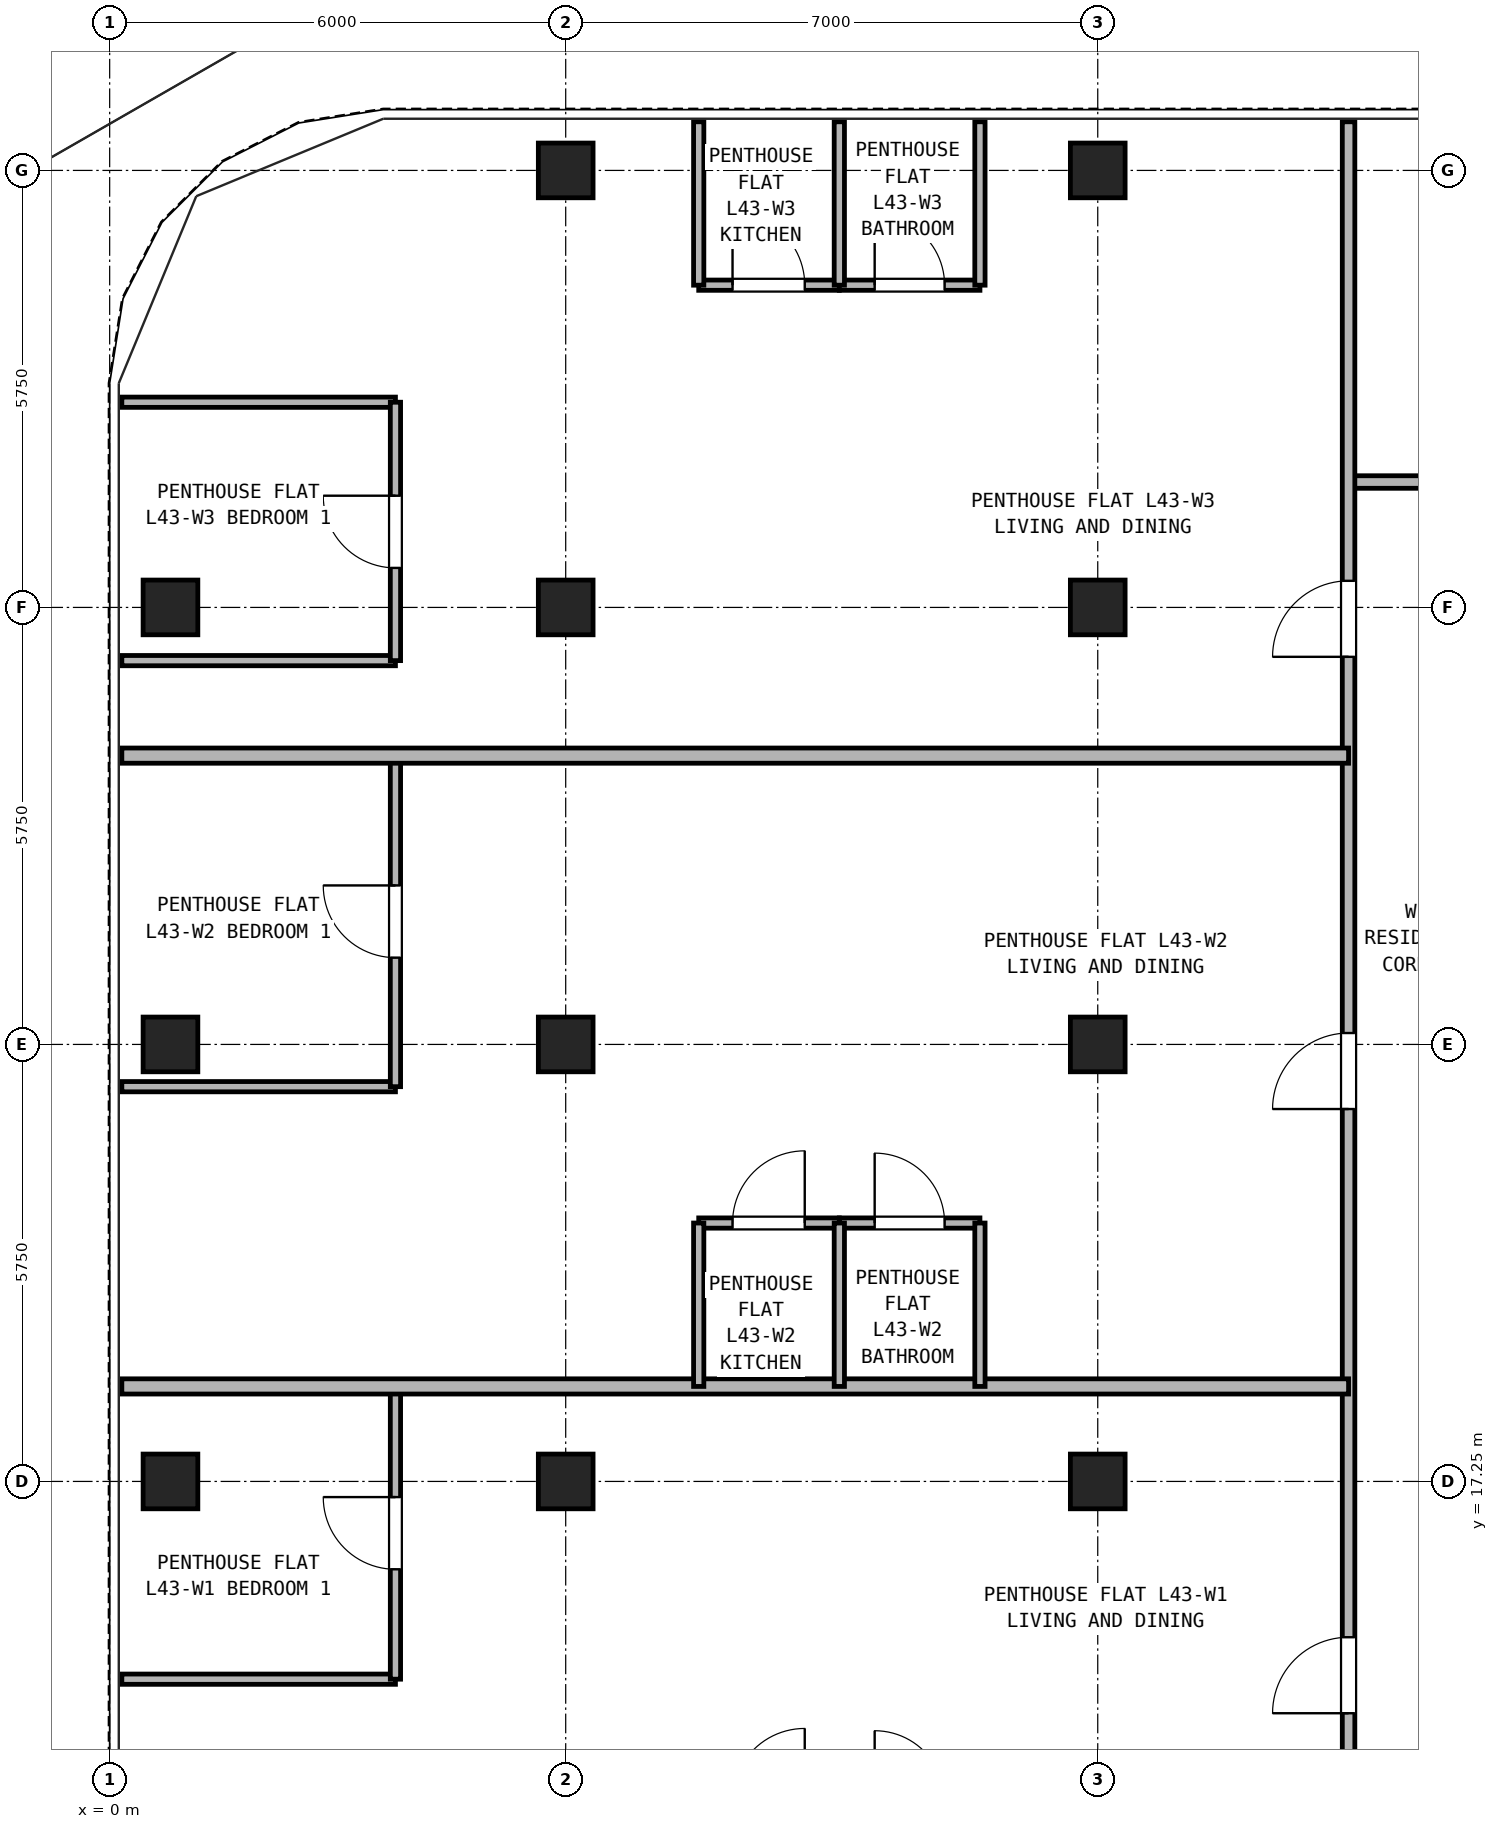
"""IFC4 building model, lengths in metres.
Left out: names, types, materials, properties, quantities, classifications, styles, units other than length and angle.
Written with IfcOpenShell. Run it as: python <this file> out.ifc"""

import sys

from ifc_helpers import new_model, si_unit, direction, frame, frame_2d, origin, origin_2d, place, context, subcontext, project, spatial, rectangle, hollow_rectangle, extrude, source, transform, mapped, element, fill, save


model = new_model("IFC4")
c1 = context("Model", 3, precision=1e-05, world=origin(), true_north=direction((0.0, 1.0)))
c2 = subcontext(c1, "Body", "Model", "MODEL_VIEW")
j1 = project(units=[si_unit("LENGTHUNIT", "METRE"), si_unit("PLANEANGLEUNIT", "RADIAN")], contexts=[c1])
p1 = place(None, origin())
s1 = spatial("IfcSite", under=j1, at=p1, CompositionType="ELEMENT")
p2 = place(p1, origin())
s2 = spatial("IfcBuilding", under=s1, at=p2, CompositionType="ELEMENT")
p3 = place(p2, frame((0.0, 0.0, 156.1)))
s3 = spatial("IfcBuildingStorey", under=s2, at=p3, CompositionType="ELEMENT", Elevation=156.1)
m1 = source(origin(), c2, "Body", "SweptSolid", [
    extrude(hollow_rectangle(XDim=0.72, YDim=0.72, WallThickness=0.04, at=origin_2d()), origin(), (0.0, 0.0, 1.0), 2.95),
])
for number, where, z_axis, x_axis in (
    (1, (6.0, 34.5, 0.0), (0.0, 0.0, 1.0), (1.0, 0.0, 0.0)),
    (2, (13.0, 34.5, 0.0), (0.0, 0.0, 1.0), (1.0, 0.0, 0.0)),
    (3, (0.8, 17.25, 0.0), (0.0, 0.0, 1.0), (1.0, 0.0, 0.0)),
    (4, (0.8, 23.0, 0.0), (0.0, 0.0, 1.0), (1.0, 0.0, 0.0)),
    (5, (0.8, 28.75, 0.0), (0.0, 0.0, 1.0), (1.0, 0.0, 0.0)),
    (6, (6.0, 17.25, 0.0), (0.0, 0.0, 1.0), (1.0, 0.0, 0.0)),
    (7, (6.0, 23.0, 0.0), (0.0, 0.0, 1.0), (1.0, 0.0, 0.0)),
    (8, (6.0, 28.75, 0.0), (0.0, 0.0, 1.0), (1.0, 0.0, 0.0)),
    (9, (13.0, 17.25, 0.0), (0.0, 0.0, 1.0), (1.0, 0.0, 0.0)),
    (10, (13.0, 23.0, 0.0), (0.0, 0.0, 1.0), (1.0, 0.0, 0.0)),
    (11, (13.0, 28.75, 0.0), (0.0, 0.0, 1.0), (1.0, 0.0, 0.0)),
):
    element("IfcColumn", number, at=place(p3, frame(where, z_axis=z_axis, x_axis=x_axis)), inside=s3, PredefinedType="COLUMN", context=c2, shape_type="MappedRepresentation", body=[
        mapped(m1, transform((0.0, 0.0, 0.0), x_axis=(1.0, 0.0, 0.0), y_axis=(0.0, 1.0, 0.0), z_axis=(0.0, 0.0, 1.0), scale=1.0)),
    ])
p4 = place(p3, frame((16.3, 30.4, 0.0), z_axis=(0.0, 0.0, 1.0), x_axis=(1.0, 0.0, 0.0)))
e12 = element("IfcWall", 12, at=p4, inside=s3, PredefinedType="PARTITIONING", context=c2, shape_type="SweptSolid", body=[
    extrude(rectangle(XDim=14.4, YDim=0.165, at=frame_2d((7.2, 0.0))), origin(), (0.0, 0.0, 1.0), 2.95),
])
p5 = place(p4, frame((2.35, 0.0, 0.0)))
e13 = element("IfcOpeningElement", 13, at=p5, cuts=e12, PredefinedType="OPENING", context=c2, shape_type="SweptSolid", body=[
    extrude(rectangle(XDim=0.95, YDim=2.15, at=frame_2d((0.475, 1.075))), frame((0.0, 0.093, 0.0), z_axis=(0.0, -1.0, 0.0), x_axis=(1.0, 0.0, 0.0)), (0.0, 0.0, 1.0), 0.185),
])
p6 = place(p4, frame((7.25, 0.0, 0.0)))
e14 = element("IfcOpeningElement", 14, at=p6, cuts=e12, PredefinedType="OPENING", context=c2, shape_type="SweptSolid", body=[
    extrude(rectangle(XDim=0.95, YDim=2.15, at=frame_2d((0.475, 1.075))), frame((0.0, 0.093, 0.0), z_axis=(0.0, -1.0, 0.0), x_axis=(1.0, 0.0, 0.0)), (0.0, 0.0, 1.0), 0.185),
])
p7 = place(p4, frame((11.6, 0.0, 0.0)))
e15 = element("IfcOpeningElement", 15, at=p7, cuts=e12, PredefinedType="OPENING", context=c2, shape_type="SweptSolid", body=[
    extrude(rectangle(XDim=0.92, YDim=2.1, at=frame_2d((0.46, 1.05))), frame((0.0, 0.093, 0.0), z_axis=(0.0, -1.0, 0.0), x_axis=(1.0, 0.0, 0.0)), (0.0, 0.0, 1.0), 0.185),
])
p8 = place(p3, frame((16.3, 10.9, 0.0), z_axis=(0.0, 0.0, 1.0), x_axis=(0.0, 1.0, 0.0)))
e16 = element("IfcWall", 16, at=p8, inside=s3, PredefinedType="PARTITIONING", context=c2, shape_type="SweptSolid", body=[
    extrude(rectangle(XDim=24.24, YDim=0.165, at=frame_2d((12.12, 0.0))), origin(), (0.0, 0.0, 1.0), 2.95),
])
p9 = place(p8, frame((3.3, 0.0, 0.0)))
e17 = element("IfcOpeningElement", 17, at=p9, cuts=e16, PredefinedType="OPENING", context=c2, shape_type="SweptSolid", body=[
    extrude(rectangle(XDim=1.0, YDim=2.15, at=frame_2d((0.5, 1.075))), frame((0.0, 0.093, 0.0), z_axis=(0.0, -1.0, 0.0), x_axis=(1.0, 0.0, 0.0)), (0.0, 0.0, 1.0), 0.185),
])
p10 = place(p8, frame((11.25, 0.0, 0.0)))
e18 = element("IfcOpeningElement", 18, at=p10, cuts=e16, PredefinedType="OPENING", context=c2, shape_type="SweptSolid", body=[
    extrude(rectangle(XDim=1.0, YDim=2.15, at=frame_2d((0.5, 1.075))), frame((0.0, 0.093, 0.0), z_axis=(0.0, -1.0, 0.0), x_axis=(1.0, 0.0, 0.0)), (0.0, 0.0, 1.0), 0.185),
])
p11 = place(p8, frame((17.2, 0.0, 0.0)))
e19 = element("IfcOpeningElement", 19, at=p11, cuts=e16, PredefinedType="OPENING", context=c2, shape_type="SweptSolid", body=[
    extrude(rectangle(XDim=1.0, YDim=2.15, at=frame_2d((0.5, 1.075))), frame((0.0, 0.093, 0.0), z_axis=(0.0, -1.0, 0.0), x_axis=(1.0, 0.0, 0.0)), (0.0, 0.0, 1.0), 0.185),
])
p12 = place(p3, frame((0.16, 14.648, 0.0), z_axis=(0.0, 0.0, 1.0), x_axis=(1.0, 0.0, 0.0)))
e20 = element("IfcWall", 20, at=p12, inside=s3, PredefinedType="PARTITIONING", context=c2, shape_type="SweptSolid", body=[
    extrude(rectangle(XDim=3.6, YDim=0.135, at=frame_2d((1.8, 0.0))), origin(), (0.0, 0.0, 1.0), 2.95),
])
p13 = place(p3, frame((3.76, 14.648, 0.0), z_axis=(0.0, 0.0, 1.0), x_axis=(0.0, 1.0, 0.0)))
e21 = element("IfcWall", 21, at=p13, inside=s3, PredefinedType="PARTITIONING", context=c2, shape_type="SweptSolid", body=[
    extrude(rectangle(XDim=3.852, YDim=0.135, at=frame_2d((1.926, 0.0))), origin(), (0.0, 0.0, 1.0), 2.95),
])
p14 = place(p13, frame((1.446, 0.0, 0.0)))
e22 = element("IfcOpeningElement", 22, at=p14, cuts=e21, PredefinedType="OPENING", context=c2, shape_type="SweptSolid", body=[
    extrude(rectangle(XDim=0.95, YDim=2.15, at=frame_2d((0.475, 1.075))), frame((0.0, 0.077, 0.0), z_axis=(0.0, -1.0, 0.0), x_axis=(1.0, 0.0, 0.0)), (0.0, 0.0, 1.0), 0.155),
])
p15 = place(p3, frame((0.16, 18.5, 0.0), z_axis=(0.0, 0.0, 1.0), x_axis=(1.0, 0.0, 0.0)))
e23 = element("IfcWall", 23, at=p15, inside=s3, PredefinedType="PARTITIONING", context=c2, shape_type="SweptSolid", body=[
    extrude(rectangle(XDim=16.14, YDim=0.2, at=frame_2d((8.07, 0.0))), origin(), (0.0, 0.0, 1.0), 2.95),
])
p16 = place(p3, frame((7.75, 20.65, 0.0), z_axis=(0.0, 0.0, 1.0), x_axis=(1.0, 0.0, 0.0)))
e24 = element("IfcWall", 24, at=p16, inside=s3, PredefinedType="PARTITIONING", context=c2, shape_type="SweptSolid", body=[
    extrude(rectangle(XDim=1.85, YDim=0.135, at=frame_2d((0.925, 0.0))), origin(), (0.0, 0.0, 1.0), 2.95),
])
p17 = place(p16, frame((0.445, 0.0, 0.0)))
e25 = element("IfcOpeningElement", 25, at=p17, cuts=e24, PredefinedType="OPENING", context=c2, shape_type="SweptSolid", body=[
    extrude(rectangle(XDim=0.95, YDim=2.15, at=frame_2d((0.475, 1.075))), frame((0.0, 0.077, 0.0), z_axis=(0.0, -1.0, 0.0), x_axis=(1.0, 0.0, 0.0)), (0.0, 0.0, 1.0), 0.155),
])
p18 = place(p3, frame((9.6, 20.65, 0.0), z_axis=(0.0, 0.0, 1.0), x_axis=(1.0, 0.0, 0.0)))
e26 = element("IfcWall", 26, at=p18, inside=s3, PredefinedType="PARTITIONING", context=c2, shape_type="SweptSolid", body=[
    extrude(rectangle(XDim=1.85, YDim=0.135, at=frame_2d((0.925, 0.0))), origin(), (0.0, 0.0, 1.0), 2.95),
])
p19 = place(p18, frame((0.465, 0.0, 0.0)))
e27 = element("IfcOpeningElement", 27, at=p19, cuts=e26, PredefinedType="OPENING", context=c2, shape_type="SweptSolid", body=[
    extrude(rectangle(XDim=0.92, YDim=2.1, at=frame_2d((0.46, 1.05))), frame((0.0, 0.077, 0.0), z_axis=(0.0, -1.0, 0.0), x_axis=(1.0, 0.0, 0.0)), (0.0, 0.0, 1.0), 0.155),
])
for number, where, z_axis, x_axis in (
    (28, (7.75, 18.5, 0.0), (0.0, 0.0, 1.0), (0.0, 1.0, 0.0)),
    (29, (9.6, 18.5, 0.0), (0.0, 0.0, 1.0), (0.0, 1.0, 0.0)),
    (30, (11.45, 18.5, 0.0), (0.0, 0.0, 1.0), (0.0, 1.0, 0.0)),
):
    element("IfcWall", number, at=place(p3, frame(where, z_axis=z_axis, x_axis=x_axis)), inside=s3, PredefinedType="PARTITIONING", context=c2, shape_type="SweptSolid", body=[
        extrude(rectangle(XDim=2.15, YDim=0.135, at=frame_2d((1.075, 0.0))), origin(), (0.0, 0.0, 1.0), 2.95),
    ])
p20 = place(p3, frame((0.16, 22.444, 0.0), z_axis=(0.0, 0.0, 1.0), x_axis=(1.0, 0.0, 0.0)))
e31 = element("IfcWall", 31, at=p20, inside=s3, PredefinedType="PARTITIONING", context=c2, shape_type="SweptSolid", body=[
    extrude(rectangle(XDim=3.6, YDim=0.135, at=frame_2d((1.8, 0.0))), origin(), (0.0, 0.0, 1.0), 2.95),
])
p21 = place(p3, frame((3.76, 22.444, 0.0), z_axis=(0.0, 0.0, 1.0), x_axis=(0.0, 1.0, 0.0)))
e32 = element("IfcWall", 32, at=p21, inside=s3, PredefinedType="PARTITIONING", context=c2, shape_type="SweptSolid", body=[
    extrude(rectangle(XDim=4.356, YDim=0.135, at=frame_2d((2.178, 0.0))), origin(), (0.0, 0.0, 1.0), 2.95),
])
p22 = place(p21, frame((1.698, 0.0, 0.0)))
e33 = element("IfcOpeningElement", 33, at=p22, cuts=e32, PredefinedType="OPENING", context=c2, shape_type="SweptSolid", body=[
    extrude(rectangle(XDim=0.95, YDim=2.15, at=frame_2d((0.475, 1.075))), frame((0.0, 0.077, 0.0), z_axis=(0.0, -1.0, 0.0), x_axis=(1.0, 0.0, 0.0)), (0.0, 0.0, 1.0), 0.155),
])
p23 = place(p3, frame((0.16, 26.8, 0.0), z_axis=(0.0, 0.0, 1.0), x_axis=(1.0, 0.0, 0.0)))
e34 = element("IfcWall", 34, at=p23, inside=s3, PredefinedType="PARTITIONING", context=c2, shape_type="SweptSolid", body=[
    extrude(rectangle(XDim=16.14, YDim=0.2, at=frame_2d((8.07, 0.0))), origin(), (0.0, 0.0, 1.0), 2.95),
])
p24 = place(p3, frame((7.75, 32.99, 0.0), z_axis=(0.0, 0.0, 1.0), x_axis=(1.0, 0.0, 0.0)))
e35 = element("IfcWall", 35, at=p24, inside=s3, PredefinedType="PARTITIONING", context=c2, shape_type="SweptSolid", body=[
    extrude(rectangle(XDim=1.85, YDim=0.135, at=frame_2d((0.925, 0.0))), origin(), (0.0, 0.0, 1.0), 2.95),
])
p25 = place(p24, frame((0.445, 0.0, 0.0)))
e36 = element("IfcOpeningElement", 36, at=p25, cuts=e35, PredefinedType="OPENING", context=c2, shape_type="SweptSolid", body=[
    extrude(rectangle(XDim=0.95, YDim=2.15, at=frame_2d((0.475, 1.075))), frame((0.0, 0.077, 0.0), z_axis=(0.0, -1.0, 0.0), x_axis=(1.0, 0.0, 0.0)), (0.0, 0.0, 1.0), 0.155),
])
p26 = place(p3, frame((9.6, 32.99, 0.0), z_axis=(0.0, 0.0, 1.0), x_axis=(1.0, 0.0, 0.0)))
e37 = element("IfcWall", 37, at=p26, inside=s3, PredefinedType="PARTITIONING", context=c2, shape_type="SweptSolid", body=[
    extrude(rectangle(XDim=1.85, YDim=0.135, at=frame_2d((0.925, 0.0))), origin(), (0.0, 0.0, 1.0), 2.95),
])
p27 = place(p26, frame((0.465, 0.0, 0.0)))
e38 = element("IfcOpeningElement", 38, at=p27, cuts=e37, PredefinedType="OPENING", context=c2, shape_type="SweptSolid", body=[
    extrude(rectangle(XDim=0.92, YDim=2.1, at=frame_2d((0.46, 1.05))), frame((0.0, 0.077, 0.0), z_axis=(0.0, -1.0, 0.0), x_axis=(1.0, 0.0, 0.0)), (0.0, 0.0, 1.0), 0.155),
])
for number, where, z_axis, x_axis in (
    (39, (7.75, 32.99, 0.0), (0.0, 0.0, 1.0), (0.0, 1.0, 0.0)),
    (40, (9.6, 32.99, 0.0), (0.0, 0.0, 1.0), (0.0, 1.0, 0.0)),
    (41, (11.45, 32.99, 0.0), (0.0, 0.0, 1.0), (0.0, 1.0, 0.0)),
):
    element("IfcWall", number, at=place(p3, frame(where, z_axis=z_axis, x_axis=x_axis)), inside=s3, PredefinedType="PARTITIONING", context=c2, shape_type="SweptSolid", body=[
        extrude(rectangle(XDim=2.15, YDim=0.135, at=frame_2d((1.075, 0.0))), origin(), (0.0, 0.0, 1.0), 2.95),
    ])
for number, where, z_axis, x_axis in (
    (42, (0.16, 28.05, 0.0), (0.0, 0.0, 1.0), (1.0, 0.0, 0.0)),
    (43, (0.16, 31.45, 0.0), (0.0, 0.0, 1.0), (1.0, 0.0, 0.0)),
):
    element("IfcWall", number, at=place(p3, frame(where, z_axis=z_axis, x_axis=x_axis)), inside=s3, PredefinedType="PARTITIONING", context=c2, shape_type="SweptSolid", body=[
        extrude(rectangle(XDim=3.6, YDim=0.135, at=frame_2d((1.8, 0.0))), origin(), (0.0, 0.0, 1.0), 2.95),
    ])
p28 = place(p3, frame((3.76, 28.05, 0.0), z_axis=(0.0, 0.0, 1.0), x_axis=(0.0, 1.0, 0.0)))
e44 = element("IfcWall", 44, at=p28, inside=s3, PredefinedType="PARTITIONING", context=c2, shape_type="SweptSolid", body=[
    extrude(rectangle(XDim=3.4, YDim=0.135, at=frame_2d((1.7, 0.0))), origin(), (0.0, 0.0, 1.0), 2.95),
])
p29 = place(p28, frame((1.22, 0.0, 0.0)))
e45 = element("IfcOpeningElement", 45, at=p29, cuts=e44, PredefinedType="OPENING", context=c2, shape_type="SweptSolid", body=[
    extrude(rectangle(XDim=0.95, YDim=2.15, at=frame_2d((0.475, 1.075))), frame((0.0, 0.077, 0.0), z_axis=(0.0, -1.0, 0.0), x_axis=(1.0, 0.0, 0.0)), (0.0, 0.0, 1.0), 0.155),
])
p30 = place(p14, origin())
e46 = element("IfcDoor", 46, at=p30, inside=s3, OperationType="SINGLE_SWING_RIGHT", PredefinedType="DOOR", context=c2, shape_type="SweptSolid", body=[
    extrude(rectangle(XDim=0.95, YDim=2.15, at=frame_2d((0.475, 1.075))), frame((0.0, 0.025, 0.0), z_axis=(0.0, -1.0, 0.0), x_axis=(1.0, 0.0, 0.0)), (0.0, 0.0, 1.0), 0.05),
])
fill(e22, e46)
p31 = place(p9, origin())
e47 = element("IfcDoor", 47, at=p31, inside=s3, OperationType="SINGLE_SWING_LEFT", PredefinedType="DOOR", context=c2, shape_type="SweptSolid", body=[
    extrude(rectangle(XDim=1.0, YDim=2.15, at=frame_2d((0.5, 1.075))), frame((0.0, 0.025, 0.0), z_axis=(0.0, -1.0, 0.0), x_axis=(1.0, 0.0, 0.0)), (0.0, 0.0, 1.0), 0.05),
])
fill(e17, e47)
p32 = place(p17, origin())
e48 = element("IfcDoor", 48, at=p32, inside=s3, OperationType="SINGLE_SWING_RIGHT", PredefinedType="DOOR", context=c2, shape_type="SweptSolid", body=[
    extrude(rectangle(XDim=0.95, YDim=2.15, at=frame_2d((0.475, 1.075))), frame((0.0, 0.025, 0.0), z_axis=(0.0, -1.0, 0.0), x_axis=(1.0, 0.0, 0.0)), (0.0, 0.0, 1.0), 0.05),
])
fill(e25, e48)
p33 = place(p19, origin())
e49 = element("IfcDoor", 49, at=p33, inside=s3, OperationType="SINGLE_SWING_LEFT", PredefinedType="DOOR", context=c2, shape_type="SweptSolid", body=[
    extrude(rectangle(XDim=0.92, YDim=2.1, at=frame_2d((0.46, 1.05))), frame((0.0, 0.025, 0.0), z_axis=(0.0, -1.0, 0.0), x_axis=(1.0, 0.0, 0.0)), (0.0, 0.0, 1.0), 0.05),
])
fill(e27, e49)
p34 = place(p22, origin())
e50 = element("IfcDoor", 50, at=p34, inside=s3, OperationType="SINGLE_SWING_RIGHT", PredefinedType="DOOR", context=c2, shape_type="SweptSolid", body=[
    extrude(rectangle(XDim=0.95, YDim=2.15, at=frame_2d((0.475, 1.075))), frame((0.0, 0.025, 0.0), z_axis=(0.0, -1.0, 0.0), x_axis=(1.0, 0.0, 0.0)), (0.0, 0.0, 1.0), 0.05),
])
fill(e33, e50)
p35 = place(p10, origin())
e51 = element("IfcDoor", 51, at=p35, inside=s3, OperationType="SINGLE_SWING_LEFT", PredefinedType="DOOR", context=c2, shape_type="SweptSolid", body=[
    extrude(rectangle(XDim=1.0, YDim=2.15, at=frame_2d((0.5, 1.075))), frame((0.0, 0.025, 0.0), z_axis=(0.0, -1.0, 0.0), x_axis=(1.0, 0.0, 0.0)), (0.0, 0.0, 1.0), 0.05),
])
fill(e18, e51)
p36 = place(p25, frame((0.95, 0.0, 0.0), z_axis=(0.0, 0.0, 1.0), x_axis=(-1.0, 0.0, 0.0)))
e52 = element("IfcDoor", 52, at=p36, inside=s3, OperationType="SINGLE_SWING_LEFT", PredefinedType="DOOR", context=c2, shape_type="SweptSolid", body=[
    extrude(rectangle(XDim=0.95, YDim=2.15, at=frame_2d((0.475, 1.075))), frame((0.0, 0.025, 0.0), z_axis=(0.0, -1.0, 0.0), x_axis=(1.0, 0.0, 0.0)), (0.0, 0.0, 1.0), 0.05),
])
fill(e36, e52)
p37 = place(p27, frame((0.92, 0.0, 0.0), z_axis=(0.0, 0.0, 1.0), x_axis=(-1.0, 0.0, 0.0)))
e53 = element("IfcDoor", 53, at=p37, inside=s3, OperationType="SINGLE_SWING_LEFT", PredefinedType="DOOR", context=c2, shape_type="SweptSolid", body=[
    extrude(rectangle(XDim=0.92, YDim=2.1, at=frame_2d((0.46, 1.05))), frame((0.0, 0.025, 0.0), z_axis=(0.0, -1.0, 0.0), x_axis=(1.0, 0.0, 0.0)), (0.0, 0.0, 1.0), 0.05),
])
fill(e38, e53)
p38 = place(p29, origin())
e54 = element("IfcDoor", 54, at=p38, inside=s3, OperationType="SINGLE_SWING_RIGHT", PredefinedType="DOOR", context=c2, shape_type="SweptSolid", body=[
    extrude(rectangle(XDim=0.95, YDim=2.15, at=frame_2d((0.475, 1.075))), frame((0.0, 0.025, 0.0), z_axis=(0.0, -1.0, 0.0), x_axis=(1.0, 0.0, 0.0)), (0.0, 0.0, 1.0), 0.05),
])
fill(e45, e54)
p39 = place(p11, origin())
e55 = element("IfcDoor", 55, at=p39, inside=s3, OperationType="SINGLE_SWING_LEFT", PredefinedType="DOOR", context=c2, shape_type="SweptSolid", body=[
    extrude(rectangle(XDim=1.0, YDim=2.15, at=frame_2d((0.5, 1.075))), frame((0.0, 0.025, 0.0), z_axis=(0.0, -1.0, 0.0), x_axis=(1.0, 0.0, 0.0)), (0.0, 0.0, 1.0), 0.05),
])
fill(e19, e55)
save(model, sys.argv[1])
